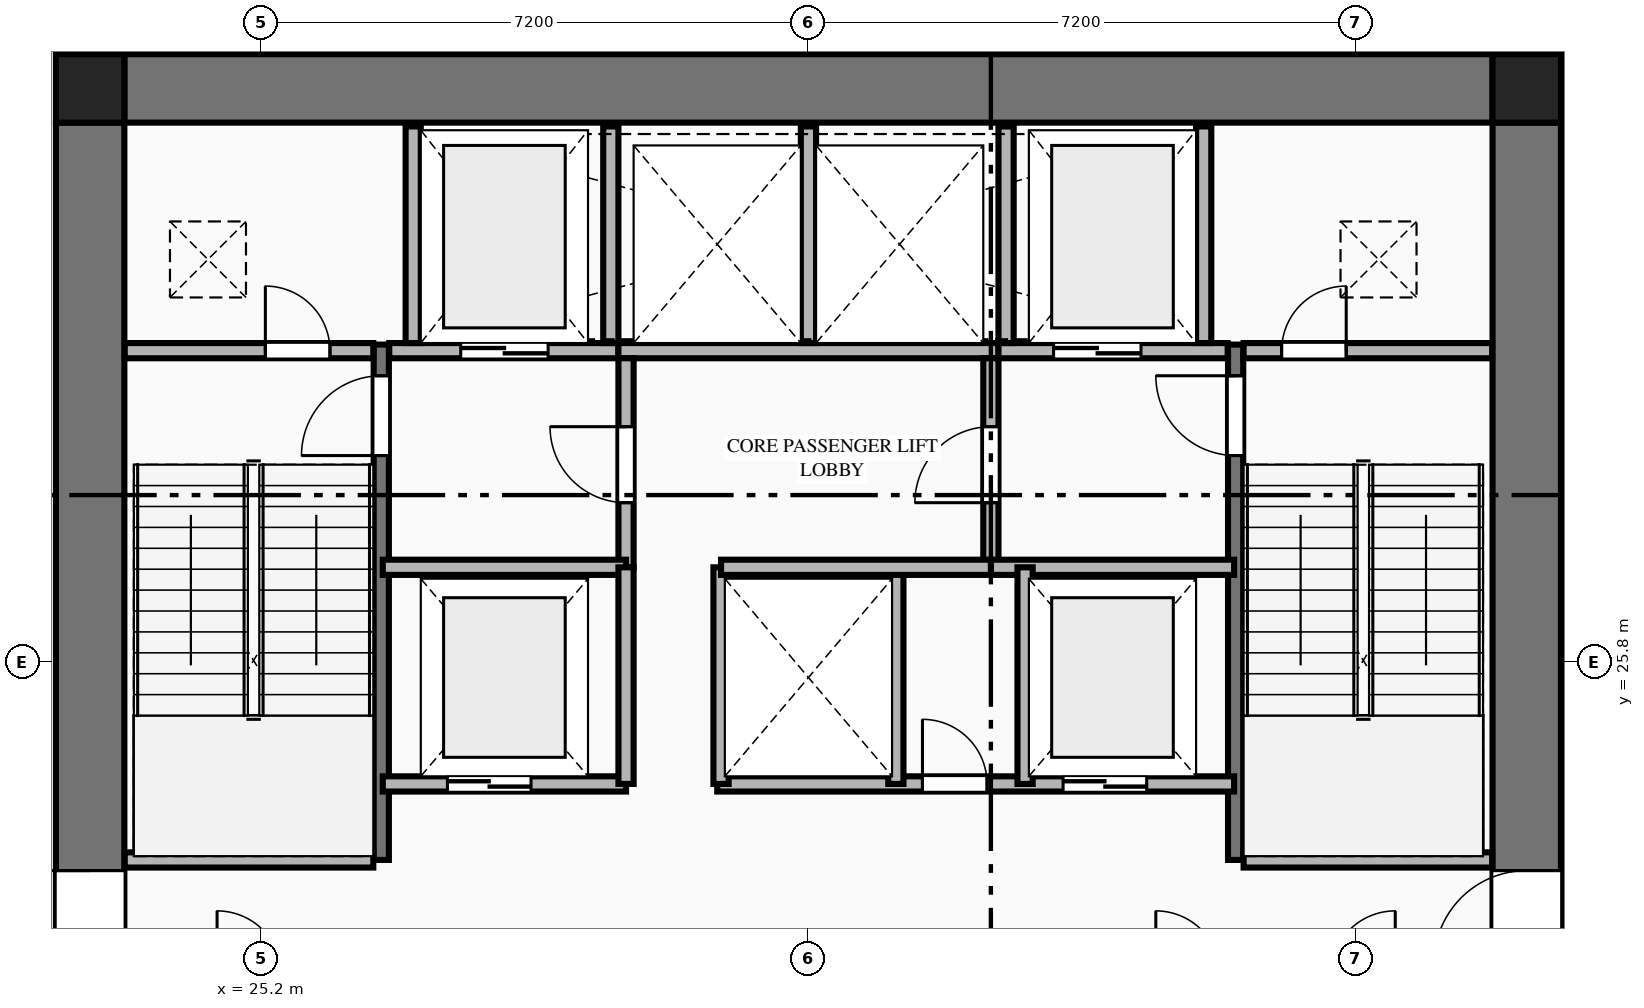
"""IFC4 building model, lengths in metres.
Left out: names, types, materials, properties, quantities, classifications, styles, units other than length and angle.
Written with IfcOpenShell. Run it as: python <this file> out.ifc"""

import sys

from ifc_helpers import new_model, si_unit, direction, frame, frame_2d, origin, origin_2d, place, context, subcontext, project, spatial, rectangle, extrude, element, fill, save


model = new_model("IFC4")
c1 = context("Model", 3, precision=1e-05, world=origin(), true_north=direction((0.0, 1.0)))
c2 = subcontext(c1, "Body", "Model", "MODEL_VIEW")
j1 = project(units=[si_unit("LENGTHUNIT", "METRE"), si_unit("PLANEANGLEUNIT", "RADIAN")], contexts=[c1])
p1 = place(None, origin())
s1 = spatial("IfcSite", under=j1, at=p1, CompositionType="ELEMENT")
p2 = place(p1, origin())
s2 = spatial("IfcBuilding", under=s1, at=p2, CompositionType="ELEMENT")
p3 = place(p2, frame((0.0, 0.0, 15.0)))
s3 = spatial("IfcBuildingStorey", under=s2, at=p3, CompositionType="ELEMENT", Elevation=15.0)
for number, where, z_axis, x_axis in (
    (1, (41.85, 33.35, 0.0), (0.0, 0.0, 1.0), (1.0, 0.0, 0.0)),
    (2, (22.95, 33.35, 0.0), (0.0, 0.0, 1.0), (1.0, 0.0, 0.0)),
):
    element("IfcColumn", number, at=place(p3, frame(where, z_axis=z_axis, x_axis=x_axis)), inside=s3, PredefinedType="COLUMN", context=c2, shape_type="SweptSolid", body=[
        extrude(rectangle(XDim=0.9, YDim=0.9, at=origin_2d()), origin(), (0.0, 0.0, 1.0), 4.5),
    ])
p4 = place(p3, frame((23.4, 33.35, 0.0), z_axis=(0.0, 0.0, 1.0), x_axis=(1.0, 0.0, 0.0)))
e3 = element("IfcWall", 3, at=p4, inside=s3, PredefinedType="SHEAR", context=c2, shape_type="SweptSolid", body=[
    extrude(rectangle(XDim=18.0, YDim=0.9, at=frame_2d((9.0, 0.0))), origin(), (0.0, 0.0, 1.0), 4.22),
])
p5 = place(p3, frame((22.95, 18.9, 0.0), z_axis=(0.0, 0.0, 1.0), x_axis=(0.0, 1.0, 0.0)))
e4 = element("IfcWall", 4, at=p5, inside=s3, PredefinedType="SHEAR", context=c2, shape_type="SweptSolid", body=[
    extrude(rectangle(XDim=14.0, YDim=0.9, at=frame_2d((7.0, 0.0))), origin(), (0.0, 0.0, 1.0), 4.22),
])
p6 = place(p5, frame((2.94, 0.0, 0.0)))
e5 = element("IfcOpeningElement", 5, at=p6, cuts=e4, PredefinedType="OPENING", context=c2, shape_type="SweptSolid", body=[
    extrude(rectangle(XDim=1.22, YDim=2.25, at=frame_2d((0.61, 1.125))), frame((0.0, 0.46, 0.0), z_axis=(0.0, -1.0, 0.0), x_axis=(1.0, 0.0, 0.0)), (0.0, 0.0, 1.0), 0.92),
])
p7 = place(p3, frame((41.85, 18.9, 0.0), z_axis=(0.0, 0.0, 1.0), x_axis=(0.0, 1.0, 0.0)))
e6 = element("IfcWall", 6, at=p7, inside=s3, PredefinedType="SHEAR", context=c2, shape_type="SweptSolid", body=[
    extrude(rectangle(XDim=14.0, YDim=0.9, at=frame_2d((7.0, 0.0))), origin(), (0.0, 0.0, 1.0), 4.22),
])
p8 = place(p7, frame((2.94, 0.0, 0.0)))
e7 = element("IfcOpeningElement", 7, at=p8, cuts=e6, PredefinedType="OPENING", context=c2, shape_type="SweptSolid", body=[
    extrude(rectangle(XDim=1.22, YDim=2.25, at=frame_2d((0.61, 1.125))), frame((0.0, 0.46, 0.0), z_axis=(0.0, -1.0, 0.0), x_axis=(1.0, 0.0, 0.0)), (0.0, 0.0, 1.0), 0.92),
])
p9 = place(p3, frame((26.78, 23.2, 0.0), z_axis=(0.0, 0.0, 1.0), x_axis=(0.0, 1.0, 0.0)))
e8 = element("IfcWall", 8, at=p9, inside=s3, PredefinedType="SHEAR", context=c2, shape_type="SweptSolid", body=[
    extrude(rectangle(XDim=6.78, YDim=0.2, at=frame_2d((3.39, 0.0))), origin(), (0.0, 0.0, 1.0), 4.5),
])
p10 = place(p9, frame((5.32, 0.0, 0.0)))
e9 = element("IfcOpeningElement", 9, at=p10, cuts=e8, PredefinedType="OPENING", context=c2, shape_type="SweptSolid", body=[
    extrude(rectangle(XDim=1.05, YDim=2.15, at=frame_2d((0.525, 1.075))), frame((0.0, 0.11, 0.0), z_axis=(0.0, -1.0, 0.0), x_axis=(1.0, 0.0, 0.0)), (0.0, 0.0, 1.0), 0.22),
])
p11 = place(p3, frame((23.405, 23.2, 0.0), z_axis=(0.0, 0.0, 1.0), x_axis=(1.0, 0.0, 0.0)))
e10 = element("IfcWall", 10, at=p11, inside=s3, PredefinedType="PLUMBINGWALL", context=c2, shape_type="SweptSolid", body=[
    extrude(rectangle(XDim=3.27, YDim=0.2, at=frame_2d((1.635, 0.0))), origin(), (0.0, 0.0, 1.0), 4.22),
])
p12 = place(p3, frame((38.02, 23.2, 0.0), z_axis=(0.0, 0.0, 1.0), x_axis=(0.0, 1.0, 0.0)))
e11 = element("IfcWall", 11, at=p12, inside=s3, PredefinedType="SHEAR", context=c2, shape_type="SweptSolid", body=[
    extrude(rectangle(XDim=6.78, YDim=0.2, at=frame_2d((3.39, 0.0))), origin(), (0.0, 0.0, 1.0), 4.5),
])
p13 = place(p12, frame((5.32, 0.0, 0.0)))
e12 = element("IfcOpeningElement", 12, at=p13, cuts=e11, PredefinedType="OPENING", context=c2, shape_type="SweptSolid", body=[
    extrude(rectangle(XDim=1.05, YDim=2.15, at=frame_2d((0.525, 1.075))), frame((0.0, 0.11, 0.0), z_axis=(0.0, -1.0, 0.0), x_axis=(1.0, 0.0, 0.0)), (0.0, 0.0, 1.0), 0.22),
])
p14 = place(p3, frame((38.125, 23.2, 0.0), z_axis=(0.0, 0.0, 1.0), x_axis=(1.0, 0.0, 0.0)))
e13 = element("IfcWall", 13, at=p14, inside=s3, PredefinedType="PLUMBINGWALL", context=c2, shape_type="SweptSolid", body=[
    extrude(rectangle(XDim=3.27, YDim=0.2, at=frame_2d((1.635, 0.0))), origin(), (0.0, 0.0, 1.0), 4.22),
])
p15 = place(p3, frame((23.405, 29.9, 0.0), z_axis=(0.0, 0.0, 1.0), x_axis=(1.0, 0.0, 0.0)))
e14 = element("IfcWall", 14, at=p15, inside=s3, PredefinedType="PLUMBINGWALL", context=c2, shape_type="SweptSolid", body=[
    extrude(rectangle(XDim=3.27, YDim=0.2, at=frame_2d((1.635, 0.0))), origin(), (0.0, 0.0, 1.0), 4.22),
])
p16 = place(p15, frame((1.85, 0.0, 0.0)))
e15 = element("IfcOpeningElement", 15, at=p16, cuts=e14, PredefinedType="OPENING", context=c2, shape_type="SweptSolid", body=[
    extrude(rectangle(XDim=0.85, YDim=2.05, at=frame_2d((0.425, 1.025))), frame((0.0, 0.11, 0.0), z_axis=(0.0, -1.0, 0.0), x_axis=(1.0, 0.0, 0.0)), (0.0, 0.0, 1.0), 0.22),
])
p17 = place(p3, frame((26.885, 29.9, 0.0), z_axis=(0.0, 0.0, 1.0), x_axis=(1.0, 0.0, 0.0)))
e16 = element("IfcWall", 16, at=p17, inside=s3, PredefinedType="PLUMBINGWALL", context=c2, shape_type="SweptSolid", body=[
    extrude(rectangle(XDim=3.015, YDim=0.2, at=frame_2d((1.507, 0.0))), origin(), (0.0, 0.0, 1.0), 4.22),
])
p18 = place(p17, frame((0.94, 0.0, 0.0)))
e17 = element("IfcOpeningElement", 17, at=p18, cuts=e16, PredefinedType="OPENING", context=c2, shape_type="SweptSolid", body=[
    extrude(rectangle(XDim=1.15, YDim=2.2, at=frame_2d((0.575, 1.1))), frame((0.0, 0.11, 0.0), z_axis=(0.0, -1.0, 0.0), x_axis=(1.0, 0.0, 0.0)), (0.0, 0.0, 1.0), 0.22),
])
p19 = place(p3, frame((29.9, 29.9, 0.0), z_axis=(0.0, 0.0, 1.0), x_axis=(1.0, 0.0, 0.0)))
e18 = element("IfcWall", 18, at=p19, inside=s3, PredefinedType="PLUMBINGWALL", context=c2, shape_type="SweptSolid", body=[
    extrude(rectangle(XDim=5.0, YDim=0.2, at=frame_2d((2.5, 0.0))), origin(), (0.0, 0.0, 1.0), 4.22),
])
p20 = place(p3, frame((34.9, 29.9, 0.0), z_axis=(0.0, 0.0, 1.0), x_axis=(1.0, 0.0, 0.0)))
e19 = element("IfcWall", 19, at=p20, inside=s3, PredefinedType="PLUMBINGWALL", context=c2, shape_type="SweptSolid", body=[
    extrude(rectangle(XDim=3.015, YDim=0.2, at=frame_2d((1.508, 0.0))), origin(), (0.0, 0.0, 1.0), 4.22),
])
p21 = place(p20, frame((0.725, 0.0, 0.0)))
e20 = element("IfcOpeningElement", 20, at=p21, cuts=e19, PredefinedType="OPENING", context=c2, shape_type="SweptSolid", body=[
    extrude(rectangle(XDim=1.15, YDim=2.2, at=frame_2d((0.575, 1.1))), frame((0.0, 0.11, 0.0), z_axis=(0.0, -1.0, 0.0), x_axis=(1.0, 0.0, 0.0)), (0.0, 0.0, 1.0), 0.22),
])
p22 = place(p3, frame((38.125, 29.9, 0.0), z_axis=(0.0, 0.0, 1.0), x_axis=(1.0, 0.0, 0.0)))
e21 = element("IfcWall", 21, at=p22, inside=s3, PredefinedType="PLUMBINGWALL", context=c2, shape_type="SweptSolid", body=[
    extrude(rectangle(XDim=3.27, YDim=0.2, at=frame_2d((1.635, 0.0))), origin(), (0.0, 0.0, 1.0), 4.22),
])
p23 = place(p22, frame((0.5, 0.0, 0.0)))
e22 = element("IfcOpeningElement", 22, at=p23, cuts=e21, PredefinedType="OPENING", context=c2, shape_type="SweptSolid", body=[
    extrude(rectangle(XDim=0.85, YDim=2.05, at=frame_2d((0.425, 1.025))), frame((0.0, 0.11, 0.0), z_axis=(0.0, -1.0, 0.0), x_axis=(1.0, 0.0, 0.0)), (0.0, 0.0, 1.0), 0.22),
])
for number, where, z_axis, x_axis in (
    (23, (27.2, 30.0, 0.0), (0.0, 0.0, 1.0), (0.0, 1.0, 0.0)),
    (24, (29.8, 30.0, 0.0), (0.0, 0.0, 1.0), (0.0, 1.0, 0.0)),
    (25, (32.4, 30.0, 0.0), (0.0, 0.0, 1.0), (0.0, 1.0, 0.0)),
    (26, (35.0, 30.0, 0.0), (0.0, 0.0, 1.0), (0.0, 1.0, 0.0)),
    (27, (37.6, 30.0, 0.0), (0.0, 0.0, 1.0), (0.0, 1.0, 0.0)),
):
    element("IfcWall", number, at=place(p3, frame(where, z_axis=z_axis, x_axis=x_axis)), inside=s3, PredefinedType="PLUMBINGWALL", context=c2, shape_type="SweptSolid", body=[
        extrude(rectangle(XDim=2.85, YDim=0.2, at=frame_2d((1.425, 0.0))), origin(), (0.0, 0.0, 1.0), 4.22),
    ])
p24 = place(p3, frame((30.0, 27.05, 0.0), z_axis=(0.0, 0.0, 1.0), x_axis=(0.0, 1.0, 0.0)))
e28 = element("IfcWall", 28, at=p24, inside=s3, PredefinedType="PLUMBINGWALL", context=c2, shape_type="SweptSolid", body=[
    extrude(rectangle(XDim=2.75, YDim=0.2, at=frame_2d((1.375, 0.0))), origin(), (0.0, 0.0, 1.0), 4.22),
])
p25 = place(p24, frame((0.85, 0.0, 0.0)))
e29 = element("IfcOpeningElement", 29, at=p25, cuts=e28, PredefinedType="OPENING", context=c2, shape_type="SweptSolid", body=[
    extrude(rectangle(XDim=1.0, YDim=2.15, at=frame_2d((0.5, 1.075))), frame((0.0, 0.11, 0.0), z_axis=(0.0, -1.0, 0.0), x_axis=(1.0, 0.0, 0.0)), (0.0, 0.0, 1.0), 0.22),
])
p26 = place(p3, frame((26.8, 27.05, 0.0), z_axis=(0.0, 0.0, 1.0), x_axis=(1.0, 0.0, 0.0)))
e30 = element("IfcWall", 30, at=p26, inside=s3, PredefinedType="PLUMBINGWALL", context=c2, shape_type="SweptSolid", body=[
    extrude(rectangle(XDim=3.2, YDim=0.2, at=frame_2d((1.6, 0.0))), origin(), (0.0, 0.0, 1.0), 4.22),
])
p27 = place(p3, frame((34.8, 27.05, 0.0), z_axis=(0.0, 0.0, 1.0), x_axis=(0.0, 1.0, 0.0)))
e31 = element("IfcWall", 31, at=p27, inside=s3, PredefinedType="PLUMBINGWALL", context=c2, shape_type="SweptSolid", body=[
    extrude(rectangle(XDim=2.75, YDim=0.2, at=frame_2d((1.375, 0.0))), origin(), (0.0, 0.0, 1.0), 4.22),
])
p28 = place(p27, frame((0.85, 0.0, 0.0)))
e32 = element("IfcOpeningElement", 32, at=p28, cuts=e31, PredefinedType="OPENING", context=c2, shape_type="SweptSolid", body=[
    extrude(rectangle(XDim=1.0, YDim=2.15, at=frame_2d((0.5, 1.075))), frame((0.0, 0.11, 0.0), z_axis=(0.0, -1.0, 0.0), x_axis=(1.0, 0.0, 0.0)), (0.0, 0.0, 1.0), 0.22),
])
p29 = place(p3, frame((34.8, 27.05, 0.0), z_axis=(0.0, 0.0, 1.0), x_axis=(1.0, 0.0, 0.0)))
e33 = element("IfcWall", 33, at=p29, inside=s3, PredefinedType="PLUMBINGWALL", context=c2, shape_type="SweptSolid", body=[
    extrude(rectangle(XDim=3.2, YDim=0.2, at=frame_2d((1.6, 0.0))), origin(), (0.0, 0.0, 1.0), 4.22),
])
p30 = place(p3, frame((26.8, 24.2, 0.0), z_axis=(0.0, 0.0, 1.0), x_axis=(1.0, 0.0, 0.0)))
e34 = element("IfcWall", 34, at=p30, inside=s3, PredefinedType="PLUMBINGWALL", context=c2, shape_type="SweptSolid", body=[
    extrude(rectangle(XDim=3.2, YDim=0.2, at=frame_2d((1.6, 0.0))), origin(), (0.0, 0.0, 1.0), 4.22),
])
p31 = place(p30, frame((0.85, 0.0, 0.0)))
e35 = element("IfcOpeningElement", 35, at=p31, cuts=e34, PredefinedType="OPENING", context=c2, shape_type="SweptSolid", body=[
    extrude(rectangle(XDim=1.1, YDim=2.2, at=frame_2d((0.55, 1.1))), frame((0.0, 0.11, 0.0), z_axis=(0.0, -1.0, 0.0), x_axis=(1.0, 0.0, 0.0)), (0.0, 0.0, 1.0), 0.22),
])
p32 = place(p3, frame((30.0, 24.2, 0.0), z_axis=(0.0, 0.0, 1.0), x_axis=(0.0, 1.0, 0.0)))
e36 = element("IfcWall", 36, at=p32, inside=s3, PredefinedType="PLUMBINGWALL", context=c2, shape_type="SweptSolid", body=[
    extrude(rectangle(XDim=2.85, YDim=0.2, at=frame_2d((1.425, 0.0))), origin(), (0.0, 0.0, 1.0), 4.22),
])
p33 = place(p3, frame((31.2, 24.2, 0.0), z_axis=(0.0, 0.0, 1.0), x_axis=(1.0, 0.0, 0.0)))
e37 = element("IfcWall", 37, at=p33, inside=s3, PredefinedType="PLUMBINGWALL", context=c2, shape_type="SweptSolid", body=[
    extrude(rectangle(XDim=6.8, YDim=0.2, at=frame_2d((3.4, 0.0))), origin(), (0.0, 0.0, 1.0), 4.22),
])
p34 = place(p33, frame((2.7, 0.0, 0.0)))
e38 = element("IfcOpeningElement", 38, at=p34, cuts=e37, PredefinedType="OPENING", context=c2, shape_type="SweptSolid", body=[
    extrude(rectangle(XDim=0.85, YDim=2.05, at=frame_2d((0.425, 1.025))), frame((0.0, 0.11, 0.0), z_axis=(0.0, -1.0, 0.0), x_axis=(1.0, 0.0, 0.0)), (0.0, 0.0, 1.0), 0.22),
])
p35 = place(p33, frame((4.55, 0.0, 0.0)))
e39 = element("IfcOpeningElement", 39, at=p35, cuts=e37, PredefinedType="OPENING", context=c2, shape_type="SweptSolid", body=[
    extrude(rectangle(XDim=1.1, YDim=2.2, at=frame_2d((0.55, 1.1))), frame((0.0, 0.11, 0.0), z_axis=(0.0, -1.0, 0.0), x_axis=(1.0, 0.0, 0.0)), (0.0, 0.0, 1.0), 0.22),
])
for number, where, z_axis, x_axis in (
    (40, (31.25, 24.2, 0.0), (0.0, 0.0, 1.0), (0.0, 1.0, 0.0)),
    (41, (33.55, 24.2, 0.0), (0.0, 0.0, 1.0), (0.0, 1.0, 0.0)),
    (42, (35.25, 24.2, 0.0), (0.0, 0.0, 1.0), (0.0, 1.0, 0.0)),
):
    element("IfcWall", number, at=place(p3, frame(where, z_axis=z_axis, x_axis=x_axis)), inside=s3, PredefinedType="PLUMBINGWALL", context=c2, shape_type="SweptSolid", body=[
        extrude(rectangle(XDim=2.85, YDim=0.2, at=frame_2d((1.425, 0.0))), origin(), (0.0, 0.0, 1.0), 4.22),
    ])
p36 = place(p3, frame((31.25, 27.05, 0.0), z_axis=(0.0, 0.0, 1.0), x_axis=(1.0, 0.0, 0.0)))
e43 = element("IfcWall", 43, at=p36, inside=s3, PredefinedType="PLUMBINGWALL", context=c2, shape_type="SweptSolid", body=[
    extrude(rectangle(XDim=3.55, YDim=0.2, at=frame_2d((1.775, 0.0))), origin(), (0.0, 0.0, 1.0), 4.22),
])
p37 = place(p6, origin())
e44 = element("IfcDoor", 44, at=p37, inside=s3, OperationType="SINGLE_SWING_RIGHT", PredefinedType="DOOR", context=c2, shape_type="SweptSolid", body=[
    extrude(rectangle(XDim=1.22, YDim=2.25, at=frame_2d((0.61, 1.125))), frame((0.0, 0.025, 0.0), z_axis=(0.0, -1.0, 0.0), x_axis=(1.0, 0.0, 0.0)), (0.0, 0.0, 1.0), 0.05),
])
fill(e5, e44)
p38 = place(p8, origin())
e45 = element("IfcDoor", 45, at=p38, inside=s3, OperationType="SINGLE_SWING_LEFT", PredefinedType="DOOR", context=c2, shape_type="SweptSolid", body=[
    extrude(rectangle(XDim=1.22, YDim=2.25, at=frame_2d((0.61, 1.125))), frame((0.0, 0.025, 0.0), z_axis=(0.0, -1.0, 0.0), x_axis=(1.0, 0.0, 0.0)), (0.0, 0.0, 1.0), 0.05),
])
fill(e7, e45)
p39 = place(p10, origin())
e46 = element("IfcDoor", 46, at=p39, inside=s3, OperationType="SINGLE_SWING_LEFT", PredefinedType="DOOR", context=c2, shape_type="SweptSolid", body=[
    extrude(rectangle(XDim=1.05, YDim=2.15, at=frame_2d((0.525, 1.075))), frame((0.0, 0.025, 0.0), z_axis=(0.0, -1.0, 0.0), x_axis=(1.0, 0.0, 0.0)), (0.0, 0.0, 1.0), 0.05),
])
fill(e9, e46)
p40 = place(p13, origin())
e47 = element("IfcDoor", 47, at=p40, inside=s3, OperationType="SINGLE_SWING_RIGHT", PredefinedType="DOOR", context=c2, shape_type="SweptSolid", body=[
    extrude(rectangle(XDim=1.05, YDim=2.15, at=frame_2d((0.525, 1.075))), frame((0.0, 0.025, 0.0), z_axis=(0.0, -1.0, 0.0), x_axis=(1.0, 0.0, 0.0)), (0.0, 0.0, 1.0), 0.05),
])
fill(e12, e47)
p41 = place(p16, origin())
e48 = element("IfcDoor", 48, at=p41, inside=s3, OperationType="SINGLE_SWING_LEFT", PredefinedType="DOOR", context=c2, shape_type="SweptSolid", body=[
    extrude(rectangle(XDim=0.85, YDim=2.05, at=frame_2d((0.425, 1.025))), frame((0.0, 0.025, 0.0), z_axis=(0.0, -1.0, 0.0), x_axis=(1.0, 0.0, 0.0)), (0.0, 0.0, 1.0), 0.05),
])
fill(e15, e48)
p42 = place(p23, origin())
e49 = element("IfcDoor", 49, at=p42, inside=s3, OperationType="SINGLE_SWING_RIGHT", PredefinedType="DOOR", context=c2, shape_type="SweptSolid", body=[
    extrude(rectangle(XDim=0.85, YDim=2.05, at=frame_2d((0.425, 1.025))), frame((0.0, 0.025, 0.0), z_axis=(0.0, -1.0, 0.0), x_axis=(1.0, 0.0, 0.0)), (0.0, 0.0, 1.0), 0.05),
])
fill(e22, e49)
p43 = place(p18, origin())
e50 = element("IfcDoor", 50, at=p43, inside=s3, OperationType="DOUBLE_DOOR_SLIDING", PredefinedType="DOOR", context=c2, shape_type="SweptSolid", body=[
    extrude(rectangle(XDim=1.15, YDim=2.2, at=frame_2d((0.575, 1.1))), frame((0.0, 0.025, 0.0), z_axis=(0.0, -1.0, 0.0), x_axis=(1.0, 0.0, 0.0)), (0.0, 0.0, 1.0), 0.05),
])
fill(e17, e50)
p44 = place(p21, origin())
e51 = element("IfcDoor", 51, at=p44, inside=s3, OperationType="DOUBLE_DOOR_SLIDING", PredefinedType="DOOR", context=c2, shape_type="SweptSolid", body=[
    extrude(rectangle(XDim=1.15, YDim=2.2, at=frame_2d((0.575, 1.1))), frame((0.0, 0.025, 0.0), z_axis=(0.0, -1.0, 0.0), x_axis=(1.0, 0.0, 0.0)), (0.0, 0.0, 1.0), 0.05),
])
fill(e20, e51)
p45 = place(p25, origin())
e52 = element("IfcDoor", 52, at=p45, inside=s3, OperationType="SINGLE_SWING_RIGHT", PredefinedType="DOOR", context=c2, shape_type="SweptSolid", body=[
    extrude(rectangle(XDim=1.0, YDim=2.15, at=frame_2d((0.5, 1.075))), frame((0.0, 0.025, 0.0), z_axis=(0.0, -1.0, 0.0), x_axis=(1.0, 0.0, 0.0)), (0.0, 0.0, 1.0), 0.05),
])
fill(e29, e52)
p46 = place(p28, origin())
e53 = element("IfcDoor", 53, at=p46, inside=s3, OperationType="SINGLE_SWING_LEFT", PredefinedType="DOOR", context=c2, shape_type="SweptSolid", body=[
    extrude(rectangle(XDim=1.0, YDim=2.15, at=frame_2d((0.5, 1.075))), frame((0.0, 0.025, 0.0), z_axis=(0.0, -1.0, 0.0), x_axis=(1.0, 0.0, 0.0)), (0.0, 0.0, 1.0), 0.05),
])
fill(e32, e53)
p47 = place(p31, origin())
e54 = element("IfcDoor", 54, at=p47, inside=s3, OperationType="DOUBLE_DOOR_SLIDING", PredefinedType="DOOR", context=c2, shape_type="SweptSolid", body=[
    extrude(rectangle(XDim=1.1, YDim=2.2, at=frame_2d((0.55, 1.1))), frame((0.0, 0.025, 0.0), z_axis=(0.0, -1.0, 0.0), x_axis=(1.0, 0.0, 0.0)), (0.0, 0.0, 1.0), 0.05),
])
fill(e35, e54)
p48 = place(p34, origin())
e55 = element("IfcDoor", 55, at=p48, inside=s3, OperationType="SINGLE_SWING_LEFT", PredefinedType="DOOR", context=c2, shape_type="SweptSolid", body=[
    extrude(rectangle(XDim=0.85, YDim=2.05, at=frame_2d((0.425, 1.025))), frame((0.0, 0.025, 0.0), z_axis=(0.0, -1.0, 0.0), x_axis=(1.0, 0.0, 0.0)), (0.0, 0.0, 1.0), 0.05),
])
fill(e38, e55)
p49 = place(p35, origin())
e56 = element("IfcDoor", 56, at=p49, inside=s3, OperationType="DOUBLE_DOOR_SLIDING", PredefinedType="DOOR", context=c2, shape_type="SweptSolid", body=[
    extrude(rectangle(XDim=1.1, YDim=2.2, at=frame_2d((0.55, 1.1))), frame((0.0, 0.025, 0.0), z_axis=(0.0, -1.0, 0.0), x_axis=(1.0, 0.0, 0.0)), (0.0, 0.0, 1.0), 0.05),
])
fill(e39, e56)
save(model, sys.argv[1])
